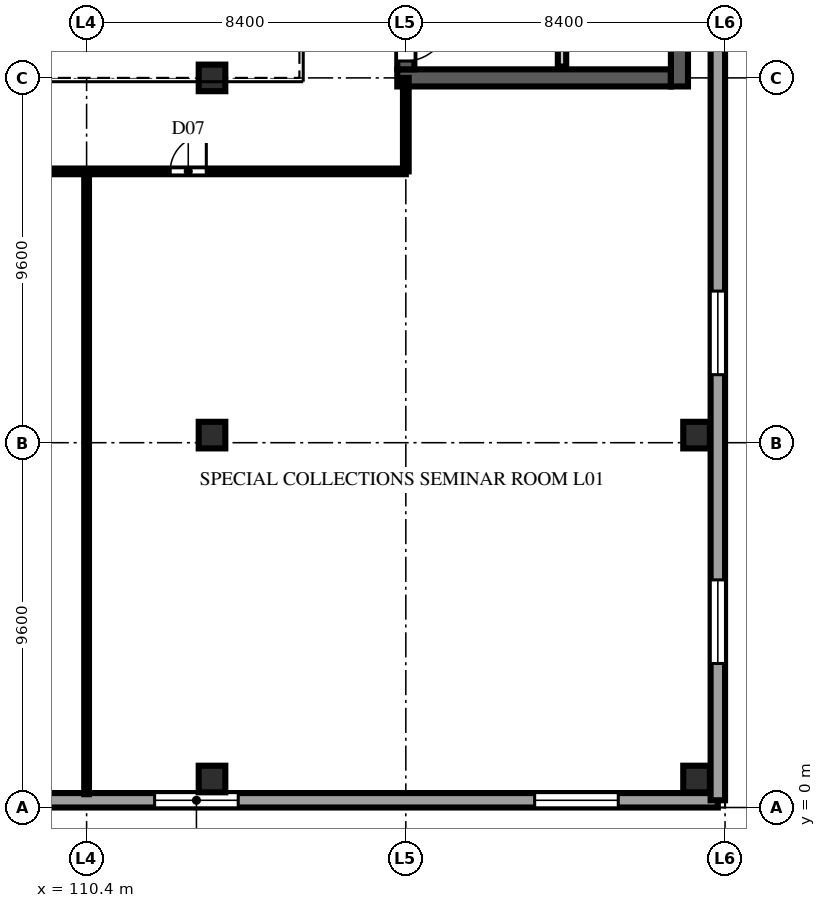
"""IFC4 building model, lengths in metres.
Left out: names, types, materials, properties, quantities, classifications, styles, units other than length and angle.
Written with IfcOpenShell. Run it as: python <this file> out.ifc"""

import sys

from ifc_helpers import new_model, si_unit, direction, frame, frame_2d, origin, origin_2d, place, context, subcontext, project, spatial, rectangle, extrude, element, fill, save


model = new_model("IFC4")
c1 = context("Model", 3, precision=1e-05, world=origin(), true_north=direction((0.0, 1.0)))
c2 = subcontext(c1, "Body", "Model", "MODEL_VIEW")
j1 = project(units=[si_unit("LENGTHUNIT", "METRE"), si_unit("PLANEANGLEUNIT", "RADIAN")], contexts=[c1])
p1 = place(None, origin())
s1 = spatial("IfcSite", under=j1, at=p1, CompositionType="ELEMENT")
p2 = place(p1, origin())
s2 = spatial("IfcBuilding", under=s1, at=p2, CompositionType="ELEMENT")
p3 = place(p2, frame((0.0, 0.0, 5.2)))
s3 = spatial("IfcBuildingStorey", under=s2, at=p3, CompositionType="ELEMENT", Elevation=5.2)
p4 = place(p3, frame((118.575, 19.2, 0.0), z_axis=(0.0, 0.0, 1.0), x_axis=(1.0, 0.0, 0.0)))
e1 = element("IfcWall", 1, at=p4, inside=s3, PredefinedType="SHEAR", context=c2, shape_type="SweptSolid", body=[
    extrude(rectangle(XDim=7.2, YDim=0.45, at=frame_2d((3.6, 0.0))), origin(), (0.0, 0.0, 1.0), 4.85),
])
p5 = place(p3, frame((126.0, 18.975, 0.0), z_axis=(0.0, 0.0, 1.0), x_axis=(0.0, 1.0, 0.0)))
e2 = element("IfcWall", 2, at=p5, inside=s3, PredefinedType="SHEAR", context=c2, shape_type="SweptSolid", body=[
    extrude(rectangle(XDim=19.65, YDim=0.45, at=frame_2d((9.825, 0.0))), origin(), (0.0, 0.0, 1.0), 4.85),
])
p6 = place(p3, frame((118.8, 19.425, 0.0), z_axis=(0.0, 0.0, 1.0), x_axis=(0.0, 1.0, 0.0)))
e3 = element("IfcWall", 3, at=p6, inside=s3, PredefinedType="SHEAR", context=c2, shape_type="SweptSolid", body=[
    extrude(rectangle(XDim=8.575, YDim=0.45, at=frame_2d((4.288, 0.0))), origin(), (0.0, 0.0, 1.0), 4.85),
])
p7 = place(p6, frame((0.22, 0.0, 0.0)))
e4 = element("IfcOpeningElement", 4, at=p7, cuts=e3, PredefinedType="OPENING", context=c2, shape_type="SweptSolid", body=[
    extrude(rectangle(XDim=1.1, YDim=2.2, at=frame_2d((0.55, 1.1))), frame((0.0, 0.237, 0.0), z_axis=(0.0, -1.0, 0.0), x_axis=(1.0, 0.0, 0.0)), (0.0, 0.0, 1.0), 0.474),
])
for number, where, z_axis, x_axis in (
    (5, (113.7, 0.75, 0.0), (0.0, 0.0, 1.0), (1.0, 0.0, 0.0)),
    (6, (113.7, 9.8, 0.0), (0.0, 0.0, 1.0), (1.0, 0.0, 0.0)),
    (7, (113.7, 19.2, 0.0), (0.0, 0.0, 1.0), (1.0, 0.0, 0.0)),
    (8, (126.45, 0.75, 0.0), (0.0, 0.0, 1.0), (1.0, 0.0, 0.0)),
    (9, (126.45, 9.8, 0.0), (0.0, 0.0, 1.0), (1.0, 0.0, 0.0)),
):
    element("IfcColumn", number, at=place(p3, frame(where, z_axis=z_axis, x_axis=x_axis)), inside=s3, PredefinedType="COLUMN", context=c2, shape_type="SweptSolid", body=[
        extrude(rectangle(XDim=0.7, YDim=0.7, at=origin_2d()), origin(), (0.0, 0.0, 1.0), 5.2),
    ])
p8 = place(p3, frame((85.39, 0.19, 0.0), z_axis=(0.0, 0.0, 1.0), x_axis=(1.0, 0.0, 0.0)))
e10 = element("IfcWall", 10, at=p8, inside=s3, PredefinedType="SOLIDWALL", context=c2, shape_type="SweptSolid", body=[
    extrude(rectangle(XDim=41.62, YDim=0.38, at=frame_2d((20.81, 0.0))), origin(), (0.0, 0.0, 1.0), 4.85),
])
p9 = place(p8, frame((5.0, 0.0, 0.85)))
e11 = element("IfcOpeningElement", 11, at=p9, cuts=e10, PredefinedType="OPENING", context=c2, shape_type="SweptSolid", body=[
    extrude(rectangle(XDim=2.2, YDim=2.25, at=frame_2d((1.1, 1.125))), frame((0.0, 0.202, 0.0), z_axis=(0.0, -1.0, 0.0), x_axis=(1.0, 0.0, 0.0)), (0.0, 0.0, 1.0), 0.404),
])
p10 = place(p8, frame((11.8, 0.0, 0.85)))
e12 = element("IfcOpeningElement", 12, at=p10, cuts=e10, PredefinedType="OPENING", context=c2, shape_type="SweptSolid", body=[
    extrude(rectangle(XDim=2.2, YDim=2.25, at=frame_2d((1.1, 1.125))), frame((0.0, 0.202, 0.0), z_axis=(0.0, -1.0, 0.0), x_axis=(1.0, 0.0, 0.0)), (0.0, 0.0, 1.0), 0.404),
])
p11 = place(p8, frame((20.2, 0.0, 0.85)))
e13 = element("IfcOpeningElement", 13, at=p11, cuts=e10, PredefinedType="OPENING", context=c2, shape_type="SweptSolid", body=[
    extrude(rectangle(XDim=2.2, YDim=2.25, at=frame_2d((1.1, 1.125))), frame((0.0, 0.202, 0.0), z_axis=(0.0, -1.0, 0.0), x_axis=(1.0, 0.0, 0.0)), (0.0, 0.0, 1.0), 0.404),
])
p12 = place(p8, frame((26.8, 0.0, 0.85)))
e14 = element("IfcOpeningElement", 14, at=p12, cuts=e10, PredefinedType="OPENING", context=c2, shape_type="SweptSolid", body=[
    extrude(rectangle(XDim=2.2, YDim=2.25, at=frame_2d((1.1, 1.125))), frame((0.0, 0.202, 0.0), z_axis=(0.0, -1.0, 0.0), x_axis=(1.0, 0.0, 0.0)), (0.0, 0.0, 1.0), 0.404),
])
p13 = place(p8, frame((36.8, 0.0, 0.85)))
e15 = element("IfcOpeningElement", 15, at=p13, cuts=e10, PredefinedType="OPENING", context=c2, shape_type="SweptSolid", body=[
    extrude(rectangle(XDim=2.2, YDim=2.25, at=frame_2d((1.1, 1.125))), frame((0.0, 0.202, 0.0), z_axis=(0.0, -1.0, 0.0), x_axis=(1.0, 0.0, 0.0)), (0.0, 0.0, 1.0), 0.404),
])
p14 = place(p3, frame((127.01, 0.19, 0.0), z_axis=(0.0, 0.0, 1.0), x_axis=(0.0, 1.0, 0.0)))
e16 = element("IfcWall", 16, at=p14, inside=s3, PredefinedType="SOLIDWALL", context=c2, shape_type="SweptSolid", body=[
    extrude(rectangle(XDim=57.22, YDim=0.38, at=frame_2d((28.61, 0.0))), origin(), (0.0, 0.0, 1.0), 4.85),
])
p15 = place(p14, frame((3.6, 0.0, 0.85)))
e17 = element("IfcOpeningElement", 17, at=p15, cuts=e16, PredefinedType="OPENING", context=c2, shape_type="SweptSolid", body=[
    extrude(rectangle(XDim=2.2, YDim=2.25, at=frame_2d((1.1, 1.125))), frame((0.0, 0.202, 0.0), z_axis=(0.0, -1.0, 0.0), x_axis=(1.0, 0.0, 0.0)), (0.0, 0.0, 1.0), 0.404),
])
p16 = place(p14, frame((11.2, 0.0, 0.85)))
e18 = element("IfcOpeningElement", 18, at=p16, cuts=e16, PredefinedType="OPENING", context=c2, shape_type="SweptSolid", body=[
    extrude(rectangle(XDim=2.2, YDim=2.25, at=frame_2d((1.1, 1.125))), frame((0.0, 0.202, 0.0), z_axis=(0.0, -1.0, 0.0), x_axis=(1.0, 0.0, 0.0)), (0.0, 0.0, 1.0), 0.404),
])
p17 = place(p14, frame((41.6, 0.0, 0.85)))
e19 = element("IfcOpeningElement", 19, at=p17, cuts=e16, PredefinedType="OPENING", context=c2, shape_type="SweptSolid", body=[
    extrude(rectangle(XDim=2.2, YDim=2.25, at=frame_2d((1.1, 1.125))), frame((0.0, 0.202, 0.0), z_axis=(0.0, -1.0, 0.0), x_axis=(1.0, 0.0, 0.0)), (0.0, 0.0, 1.0), 0.404),
])
p18 = place(p14, frame((49.2, 0.0, 0.85)))
e20 = element("IfcOpeningElement", 20, at=p18, cuts=e16, PredefinedType="OPENING", context=c2, shape_type="SweptSolid", body=[
    extrude(rectangle(XDim=2.2, YDim=2.25, at=frame_2d((1.1, 1.125))), frame((0.0, 0.202, 0.0), z_axis=(0.0, -1.0, 0.0), x_axis=(1.0, 0.0, 0.0)), (0.0, 0.0, 1.0), 0.404),
])
p19 = place(p3, frame((122.91, 19.5, 0.0), z_axis=(0.0, 0.0, 1.0), x_axis=(0.0, 1.0, 0.0)))
e21 = element("IfcWall", 21, at=p19, inside=s3, PredefinedType="SOLIDWALL", context=c2, shape_type="SweptSolid", body=[
    extrude(rectangle(XDim=7.71, YDim=0.22, at=frame_2d((3.855, 0.0))), origin(), (0.0, 0.0, 1.0), 4.85),
])
p20 = place(p3, frame((110.4, 0.35, 0.0), z_axis=(0.0, 0.0, 1.0), x_axis=(0.0, 1.0, 0.0)))
e22 = element("IfcWall", 22, at=p20, inside=s3, PredefinedType="PARTITIONING", context=c2, shape_type="SweptSolid", body=[
    extrude(rectangle(XDim=16.39, YDim=0.125, at=frame_2d((8.195, 0.0))), origin(), (0.0, 0.0, 1.0), 4.85),
])
p21 = place(p3, frame((118.8, 16.74, 0.0), z_axis=(0.0, 0.0, 1.0), x_axis=(0.0, 1.0, 0.0)))
e23 = element("IfcWall", 23, at=p21, inside=s3, PredefinedType="PARTITIONING", context=c2, shape_type="SweptSolid", body=[
    extrude(rectangle(XDim=2.46, YDim=0.15, at=frame_2d((1.23, 0.0))), origin(), (0.0, 0.0, 1.0), 4.85),
])
p22 = place(p3, frame((93.6, 16.74, 0.0), z_axis=(0.0, 0.0, 1.0), x_axis=(1.0, 0.0, 0.0)))
e24 = element("IfcWall", 24, at=p22, inside=s3, PredefinedType="PARTITIONING", context=c2, shape_type="SweptSolid", body=[
    extrude(rectangle(XDim=25.2, YDim=0.15, at=frame_2d((12.6, 0.0))), origin(), (0.0, 0.0, 1.0), 4.85),
])
p23 = place(p22, frame((4.0, 0.0, 0.0)))
e25 = element("IfcOpeningElement", 25, at=p23, cuts=e24, PredefinedType="OPENING", context=c2, shape_type="SweptSolid", body=[
    extrude(rectangle(XDim=1.0, YDim=2.2, at=frame_2d((0.5, 1.1))), frame((0.0, 0.087, 0.0), z_axis=(0.0, -1.0, 0.0), x_axis=(1.0, 0.0, 0.0)), (0.0, 0.0, 1.0), 0.174),
])
p24 = place(p22, frame((19.0, 0.0, 0.0)))
e26 = element("IfcOpeningElement", 26, at=p24, cuts=e24, PredefinedType="OPENING", context=c2, shape_type="SweptSolid", body=[
    extrude(rectangle(XDim=0.95, YDim=2.15, at=frame_2d((0.475, 1.075))), frame((0.0, 0.087, 0.0), z_axis=(0.0, -1.0, 0.0), x_axis=(1.0, 0.0, 0.0)), (0.0, 0.0, 1.0), 0.174),
])
p25 = place(p12, origin())
e27 = element("IfcWindow", 27, at=p25, inside=s3, PartitioningType="DOUBLE_PANEL_VERTICAL", PredefinedType="WINDOW", context=c2, shape_type="SweptSolid", body=[
    extrude(rectangle(XDim=2.2, YDim=2.25, at=frame_2d((1.1, 1.125))), frame((0.0, 0.11, 0.0), z_axis=(0.0, -1.0, 0.0), x_axis=(1.0, 0.0, 0.0)), (0.0, 0.0, 1.0), 0.06),
])
fill(e14, e27)
p26 = place(p13, origin())
e28 = element("IfcWindow", 28, at=p26, inside=s3, PartitioningType="DOUBLE_PANEL_VERTICAL", PredefinedType="WINDOW", context=c2, shape_type="SweptSolid", body=[
    extrude(rectangle(XDim=2.2, YDim=2.25, at=frame_2d((1.1, 1.125))), frame((0.0, 0.11, 0.0), z_axis=(0.0, -1.0, 0.0), x_axis=(1.0, 0.0, 0.0)), (0.0, 0.0, 1.0), 0.06),
])
fill(e15, e28)
p27 = place(p15, origin())
e29 = element("IfcWindow", 29, at=p27, inside=s3, PartitioningType="DOUBLE_PANEL_VERTICAL", PredefinedType="WINDOW", context=c2, shape_type="SweptSolid", body=[
    extrude(rectangle(XDim=2.2, YDim=2.25, at=frame_2d((1.1, 1.125))), frame((0.0, 0.11, 0.0), z_axis=(0.0, -1.0, 0.0), x_axis=(1.0, 0.0, 0.0)), (0.0, 0.0, 1.0), 0.06),
])
fill(e17, e29)
p28 = place(p16, origin())
e30 = element("IfcWindow", 30, at=p28, inside=s3, PartitioningType="DOUBLE_PANEL_VERTICAL", PredefinedType="WINDOW", context=c2, shape_type="SweptSolid", body=[
    extrude(rectangle(XDim=2.2, YDim=2.25, at=frame_2d((1.1, 1.125))), frame((0.0, 0.11, 0.0), z_axis=(0.0, -1.0, 0.0), x_axis=(1.0, 0.0, 0.0)), (0.0, 0.0, 1.0), 0.06),
])
fill(e18, e30)
p29 = place(p7, frame((1.1, 0.0, 0.0), z_axis=(0.0, 0.0, 1.0), x_axis=(-1.0, 0.0, 0.0)))
e31 = element("IfcDoor", 31, at=p29, inside=s3, OperationType="SINGLE_SWING_LEFT", PredefinedType="DOOR", context=c2, shape_type="SweptSolid", body=[
    extrude(rectangle(XDim=1.1, YDim=2.2, at=frame_2d((0.55, 1.1))), frame((0.0, 0.025, 0.0), z_axis=(0.0, -1.0, 0.0), x_axis=(1.0, 0.0, 0.0)), (0.0, 0.0, 1.0), 0.05),
])
fill(e4, e31)
p30 = place(p24, origin())
e32 = element("IfcDoor", 32, at=p30, inside=s3, OperationType="SINGLE_SWING_RIGHT", PredefinedType="DOOR", context=c2, shape_type="SweptSolid", body=[
    extrude(rectangle(XDim=0.95, YDim=2.15, at=frame_2d((0.475, 1.075))), frame((0.0, 0.025, 0.0), z_axis=(0.0, -1.0, 0.0), x_axis=(1.0, 0.0, 0.0)), (0.0, 0.0, 1.0), 0.05),
])
fill(e26, e32)
save(model, sys.argv[1])
